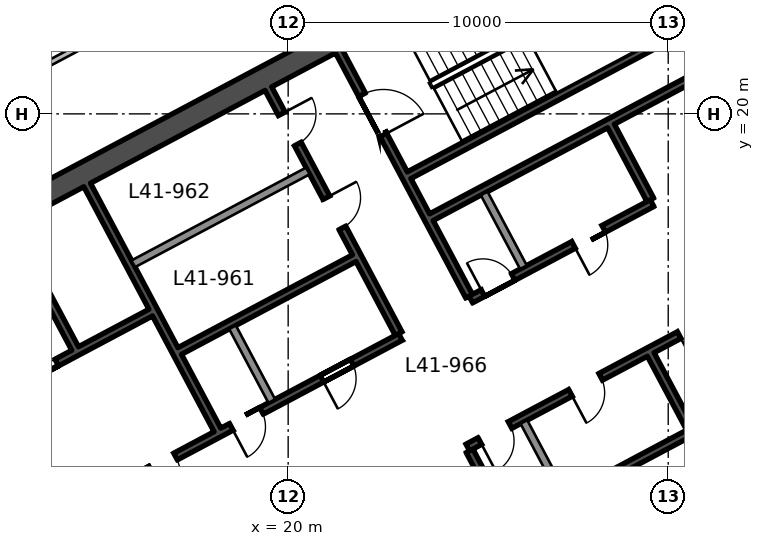
"""IFC4 building model, lengths in metres.
Left out: names, types, materials, properties, quantities, classifications, styles, units other than length and angle.
Written with IfcOpenShell. Run it as: python <this file> out.ifc"""

import sys

from ifc_helpers import new_model, si_unit, direction, frame, frame_2d, origin, place, context, subcontext, project, spatial, rectangle, extrude, element, fill, save


model = new_model("IFC4")
c1 = context("Model", 3, precision=1e-05, world=origin(), true_north=direction((0.0, 1.0)))
c2 = subcontext(c1, "Body", "Model", "MODEL_VIEW")
j1 = project(units=[si_unit("LENGTHUNIT", "METRE"), si_unit("PLANEANGLEUNIT", "RADIAN")], contexts=[c1])
p1 = place(None, origin())
s1 = spatial("IfcSite", under=j1, at=p1, CompositionType="ELEMENT")
p2 = place(p1, origin())
s2 = spatial("IfcBuilding", under=s1, at=p2, CompositionType="ELEMENT")
p3 = place(p2, frame((0.0, 0.0, 193.5)))
s3 = spatial("IfcBuildingStorey", under=s2, at=p3, CompositionType="ELEMENT", Elevation=193.5)
p4 = place(p3, frame((19.211, -0.771, 0.0), z_axis=(0.0, 0.0, 1.0), x_axis=(-0.469463742137, 0.882951751127, 0.0)))
e1 = element("IfcWall", 1, at=p4, inside=s3, PredefinedType="SHEAR", context=c2, shape_type="SweptSolid", body=[
    extrude(rectangle(XDim=19.4, YDim=0.6, at=frame_2d((9.7, 0.0))), origin(), (0.0, 0.0, 1.0), 3.9),
])
p5 = place(p4, frame((6.7, 0.0, 0.0)))
e2 = element("IfcOpeningElement", 2, at=p5, cuts=e1, PredefinedType="OPENING", context=c2, shape_type="SweptSolid", body=[
    extrude(rectangle(XDim=2.4, YDim=2.4, at=frame_2d((1.2, 1.2))), frame((0.0, 0.31, 0.0), z_axis=(0.0, -1.0, 0.0), x_axis=(1.0, 0.0, 0.0)), (0.0, 0.0, 1.0), 0.62),
])
p6 = place(p3, frame((37.576, 8.994, 0.0), z_axis=(0.0, 0.0, 1.0), x_axis=(-0.469478769487, 0.88294376095, 0.0)))
e3 = element("IfcWall", 3, at=p6, inside=s3, PredefinedType="SHEAR", context=c2, shape_type="SweptSolid", body=[
    extrude(rectangle(XDim=19.4, YDim=0.6, at=frame_2d((9.7, 0.0))), origin(), (0.0, 0.0, 1.0), 3.9),
])
p7 = place(p6, frame((10.3, 0.0, 0.0)))
e4 = element("IfcOpeningElement", 4, at=p7, cuts=e3, PredefinedType="OPENING", context=c2, shape_type="SweptSolid", body=[
    extrude(rectangle(XDim=2.4, YDim=2.4, at=frame_2d((1.2, 1.2))), frame((0.0, 0.31, 0.0), z_axis=(0.0, -1.0, 0.0), x_axis=(1.0, 0.0, 0.0)), (0.0, 0.0, 1.0), 0.62),
])
p8 = place(p3, frame((10.509, 16.234, 0.0), z_axis=(0.0, 0.0, 1.0), x_axis=(0.88295010195, 0.469466843842, 0.0)))
e5 = element("IfcWall", 5, at=p8, inside=s3, PredefinedType="SHEAR", context=c2, shape_type="SweptSolid", body=[
    extrude(rectangle(XDim=20.2, YDim=0.6, at=frame_2d((10.1, 0.0))), origin(), (0.0, 0.0, 1.0), 3.9),
])
p9 = place(p3, frame((14.394, 13.826, 0.0), z_axis=(0.0, 0.0, 1.0), x_axis=(-0.469494272526, 0.882935517501, 0.0)))
e6 = element("IfcWall", 6, at=p9, inside=s3, PredefinedType="SHEAR", context=c2, shape_type="SweptSolid", body=[
    extrude(rectangle(XDim=3.65, YDim=0.2, at=frame_2d((1.825, 0.0))), origin(), (0.0, 0.0, 1.0), 3.9),
])
p10 = place(p3, frame((18.138, 11.683, 0.0), z_axis=(0.0, 0.0, 1.0), x_axis=(-0.469480409012, 0.88294288918, 0.0)))
e7 = element("IfcWall", 7, at=p10, inside=s3, PredefinedType="SHEAR", context=c2, shape_type="SweptSolid", body=[
    extrude(rectangle(XDim=7.3, YDim=0.2, at=frame_2d((3.65, 0.0))), origin(), (0.0, 0.0, 1.0), 3.9),
])
p11 = place(p3, frame((19.569, 12.444, 0.0), z_axis=(0.0, 0.0, 1.0), x_axis=(-0.4694473164, 0.882960484464, 0.0)))
e8 = element("IfcWall", 8, at=p11, inside=s3, PredefinedType="SOLIDWALL", context=c2, shape_type="SweptSolid", body=[
    extrude(rectangle(XDim=2.2, YDim=0.2, at=frame_2d((1.1, 0.0))), origin(), (0.0, 0.0, 1.0), 3.9),
])
p12 = place(p3, frame((22.906, 14.218, 0.0), z_axis=(0.0, 0.0, 1.0), x_axis=(-0.469480409012, 0.88294288918, 0.0)))
e9 = element("IfcWall", 9, at=p12, inside=s3, PredefinedType="SHEAR", context=c2, shape_type="SweptSolid", body=[
    extrude(rectangle(XDim=7.3, YDim=0.2, at=frame_2d((3.65, 0.0))), origin(), (0.0, 0.0, 1.0), 3.9),
])
p13 = place(p12, frame((3.15, 0.0, 0.0)))
e10 = element("IfcOpeningElement", 10, at=p13, cuts=e9, PredefinedType="OPENING", context=c2, shape_type="SweptSolid", body=[
    extrude(rectangle(XDim=0.9, YDim=2.1, at=frame_2d((0.45, 1.05))), frame((0.0, 0.11, 0.0), z_axis=(0.0, -1.0, 0.0), x_axis=(1.0, 0.0, 0.0)), (0.0, 0.0, 1.0), 0.22),
])
p14 = place(p12, frame((5.65, 0.0, 0.0)))
e11 = element("IfcOpeningElement", 11, at=p14, cuts=e9, PredefinedType="OPENING", context=c2, shape_type="SweptSolid", body=[
    extrude(rectangle(XDim=0.9, YDim=2.1, at=frame_2d((0.45, 1.05))), frame((0.0, 0.11, 0.0), z_axis=(0.0, -1.0, 0.0), x_axis=(1.0, 0.0, 0.0)), (0.0, 0.0, 1.0), 0.22),
])
p15 = place(p3, frame((28.2, 4.688, 0.0), z_axis=(0.0, 0.0, 1.0), x_axis=(-0.469454336211, 0.882956752176, 0.0)))
e12 = element("IfcWall", 12, at=p15, inside=s3, PredefinedType="SHEAR", context=c2, shape_type="SweptSolid", body=[
    extrude(rectangle(XDim=7.3, YDim=0.2, at=frame_2d((3.65, 0.0))), origin(), (0.0, 0.0, 1.0), 3.9),
])
p16 = place(p15, frame((0.45, 0.0, 0.0)))
e13 = element("IfcOpeningElement", 13, at=p16, cuts=e12, PredefinedType="OPENING", context=c2, shape_type="SweptSolid", body=[
    extrude(rectangle(XDim=0.9, YDim=2.1, at=frame_2d((0.45, 1.05))), frame((0.0, 0.11, 0.0), z_axis=(0.0, -1.0, 0.0), x_axis=(1.0, 0.0, 0.0)), (0.0, 0.0, 1.0), 0.22),
])
p17 = place(p15, frame((2.15, 0.0, 0.0)))
e14 = element("IfcOpeningElement", 14, at=p17, cuts=e12, PredefinedType="OPENING", context=c2, shape_type="SweptSolid", body=[
    extrude(rectangle(XDim=0.9, YDim=2.1, at=frame_2d((0.45, 1.05))), frame((0.0, 0.11, 0.0), z_axis=(0.0, -1.0, 0.0), x_axis=(1.0, 0.0, 0.0)), (0.0, 0.0, 1.0), 0.22),
])
p18 = place(p15, frame((3.75, 0.0, 0.0)))
e15 = element("IfcOpeningElement", 15, at=p18, cuts=e12, PredefinedType="OPENING", context=c2, shape_type="SweptSolid", body=[
    extrude(rectangle(XDim=0.9, YDim=2.1, at=frame_2d((0.45, 1.05))), frame((0.0, 0.11, 0.0), z_axis=(0.0, -1.0, 0.0), x_axis=(1.0, 0.0, 0.0)), (0.0, 0.0, 1.0), 0.22),
])
p19 = place(p3, frame((27.236, 9.951, 0.0), z_axis=(0.0, 0.0, 1.0), x_axis=(-0.4694473164, 0.882960484464, 0.0)))
e16 = element("IfcWall", 16, at=p19, inside=s3, PredefinedType="SOLIDWALL", context=c2, shape_type="SweptSolid", body=[
    extrude(rectangle(XDim=2.2, YDim=0.2, at=frame_2d((1.1, 0.0))), origin(), (0.0, 0.0, 1.0), 3.9),
])
p20 = place(p3, frame((24.76, 15.204, 0.0), z_axis=(0.0, 0.0, 1.0), x_axis=(-0.469494272526, 0.882935517501, 0.0)))
e17 = element("IfcWall", 17, at=p20, inside=s3, PredefinedType="SHEAR", context=c2, shape_type="SweptSolid", body=[
    extrude(rectangle(XDim=7.3, YDim=0.2, at=frame_2d((3.65, 0.0))), origin(), (0.0, 0.0, 1.0), 3.9),
])
p21 = place(p20, frame((4.8, 0.0, 0.0)))
e18 = element("IfcOpeningElement", 18, at=p21, cuts=e17, PredefinedType="OPENING", context=c2, shape_type="SweptSolid", body=[
    extrude(rectangle(XDim=1.2, YDim=2.1, at=frame_2d((0.6, 1.05))), frame((0.0, 0.11, 0.0), z_axis=(0.0, -1.0, 0.0), x_axis=(1.0, 0.0, 0.0)), (0.0, 0.0, 1.0), 0.22),
])
p22 = place(p3, frame((26.191, 15.965, 0.0), z_axis=(0.0, 0.0, 1.0), x_axis=(-0.469533832133, 0.882914480843, 0.0)))
e19 = element("IfcWall", 19, at=p22, inside=s3, PredefinedType="SOLIDWALL", context=c2, shape_type="SweptSolid", body=[
    extrude(rectangle(XDim=2.2, YDim=0.2, at=frame_2d((1.1, 0.0))), origin(), (0.0, 0.0, 1.0), 3.9),
])
p23 = place(p3, frame((32.968, 7.223, 0.0), z_axis=(0.0, 0.0, 1.0), x_axis=(-0.469480409012, 0.88294288918, 0.0)))
e20 = element("IfcWall", 20, at=p23, inside=s3, PredefinedType="SHEAR", context=c2, shape_type="SweptSolid", body=[
    extrude(rectangle(XDim=7.3, YDim=0.2, at=frame_2d((3.65, 0.0))), origin(), (0.0, 0.0, 1.0), 3.9),
])
p24 = place(p3, frame((29.528, 17.739, 0.0), z_axis=(0.0, 0.0, 1.0), x_axis=(-0.469401318492, 0.882984938828, 0.0)))
e21 = element("IfcWall", 21, at=p24, inside=s3, PredefinedType="SHEAR", context=c2, shape_type="SweptSolid", body=[
    extrude(rectangle(XDim=2.2, YDim=0.2, at=frame_2d((1.1, 0.0))), origin(), (0.0, 0.0, 1.0), 3.9),
])
p25 = place(p3, frame((25.941, 9.15, 0.0), z_axis=(0.0, 0.0, 1.0), x_axis=(0.882953967957, 0.469459572775, 0.0)))
e22 = element("IfcWall", 22, at=p25, inside=s3, PredefinedType="SHEAR", context=c2, shape_type="SweptSolid", body=[
    extrude(rectangle(XDim=5.2, YDim=0.2, at=frame_2d((2.6, 0.0))), origin(), (0.0, 0.0, 1.0), 3.9),
])
p26 = place(p3, frame((24.726, 11.222, 0.0), z_axis=(0.0, 0.0, 1.0), x_axis=(0.882940221191, 0.469485426614, 0.0)))
e23 = element("IfcWall", 23, at=p26, inside=s3, PredefinedType="SHEAR", context=c2, shape_type="SweptSolid", body=[
    extrude(rectangle(XDim=10.0, YDim=0.2, at=frame_2d((5.0, 0.0))), origin(), (0.0, 0.0, 1.0), 3.9),
])
p27 = place(p26, frame((6.3, 0.0, 0.0)))
e24 = element("IfcOpeningElement", 24, at=p27, cuts=e23, PredefinedType="OPENING", context=c2, shape_type="SweptSolid", body=[
    extrude(rectangle(XDim=1.2, YDim=2.1, at=frame_2d((0.6, 1.05))), frame((0.0, 0.11, 0.0), z_axis=(0.0, -1.0, 0.0), x_axis=(1.0, 0.0, 0.0)), (0.0, 0.0, 1.0), 0.22),
])
p28 = place(p26, frame((0.36, 0.0, 0.0)))
e25 = element("IfcOpeningElement", 25, at=p28, cuts=e23, PredefinedType="OPENING", context=c2, shape_type="SweptSolid", body=[
    extrude(rectangle(XDim=0.9, YDim=2.1, at=frame_2d((0.45, 1.05))), frame((0.0, 0.11, 0.0), z_axis=(0.0, -1.0, 0.0), x_axis=(1.0, 0.0, 0.0)), (0.0, 0.0, 1.0), 0.22),
])
p29 = place(p26, frame((3.06, 0.0, 0.0)))
e26 = element("IfcOpeningElement", 26, at=p29, cuts=e23, PredefinedType="OPENING", context=c2, shape_type="SweptSolid", body=[
    extrude(rectangle(XDim=0.9, YDim=2.1, at=frame_2d((0.45, 1.05))), frame((0.0, 0.11, 0.0), z_axis=(0.0, -1.0, 0.0), x_axis=(1.0, 0.0, 0.0)), (0.0, 0.0, 1.0), 0.22),
])
p30 = place(p3, frame((14.124, 9.435, 0.0), z_axis=(0.0, 0.0, 1.0), x_axis=(0.882940221191, 0.469485426614, 0.0)))
e27 = element("IfcWall", 27, at=p30, inside=s3, PredefinedType="SHEAR", context=c2, shape_type="SweptSolid", body=[
    extrude(rectangle(XDim=10.0, YDim=0.2, at=frame_2d((5.0, 0.0))), origin(), (0.0, 0.0, 1.0), 3.9),
])
p31 = place(p30, frame((2.1, 0.0, 0.0)))
e28 = element("IfcOpeningElement", 28, at=p31, cuts=e27, PredefinedType="OPENING", context=c2, shape_type="SweptSolid", body=[
    extrude(rectangle(XDim=1.2, YDim=2.1, at=frame_2d((0.6, 1.05))), frame((0.0, 0.11, 0.0), z_axis=(0.0, -1.0, 0.0), x_axis=(1.0, 0.0, 0.0)), (0.0, 0.0, 1.0), 0.22),
])
p32 = place(p30, frame((4.96, 0.0, 0.0)))
e29 = element("IfcOpeningElement", 29, at=p32, cuts=e27, PredefinedType="OPENING", context=c2, shape_type="SweptSolid", body=[
    extrude(rectangle(XDim=0.9, YDim=2.1, at=frame_2d((0.45, 1.05))), frame((0.0, 0.11, 0.0), z_axis=(0.0, -1.0, 0.0), x_axis=(1.0, 0.0, 0.0)), (0.0, 0.0, 1.0), 0.22),
])
p33 = place(p30, frame((7.66, 0.0, 0.0)))
e30 = element("IfcOpeningElement", 30, at=p33, cuts=e27, PredefinedType="OPENING", context=c2, shape_type="SweptSolid", body=[
    extrude(rectangle(XDim=0.9, YDim=2.1, at=frame_2d((0.45, 1.05))), frame((0.0, 0.11, 0.0), z_axis=(0.0, -1.0, 0.0), x_axis=(1.0, 0.0, 0.0)), (0.0, 0.0, 1.0), 0.22),
])
p34 = place(p3, frame((24.807, 15.116, 0.0), z_axis=(0.0, 0.0, 1.0), x_axis=(0.882942972946, 0.469480251476, 0.0)))
e31 = element("IfcWall", 31, at=p34, inside=s3, PredefinedType="SHEAR", context=c2, shape_type="SweptSolid", body=[
    extrude(rectangle(XDim=5.4, YDim=0.2, at=frame_2d((2.7, 0.0))), origin(), (0.0, 0.0, 1.0), 3.9),
])
p35 = place(p34, frame((0.36, 0.0, 0.0)))
e32 = element("IfcOpeningElement", 32, at=p35, cuts=e31, PredefinedType="OPENING", context=c2, shape_type="SweptSolid", body=[
    extrude(rectangle(XDim=0.9, YDim=2.1, at=frame_2d((0.45, 1.05))), frame((0.0, 0.11, 0.0), z_axis=(0.0, -1.0, 0.0), x_axis=(1.0, 0.0, 0.0)), (0.0, 0.0, 1.0), 0.22),
])
p36 = place(p34, frame((3.06, 0.0, 0.0)))
e33 = element("IfcOpeningElement", 33, at=p36, cuts=e31, PredefinedType="OPENING", context=c2, shape_type="SweptSolid", body=[
    extrude(rectangle(XDim=0.9, YDim=2.1, at=frame_2d((0.45, 1.05))), frame((0.0, 0.11, 0.0), z_axis=(0.0, -1.0, 0.0), x_axis=(1.0, 0.0, 0.0)), (0.0, 0.0, 1.0), 0.22),
])
p37 = place(p3, frame((17.147, 13.761, 0.0), z_axis=(0.0, 0.0, 1.0), x_axis=(0.882964314875, 0.469440111896, 0.0)))
e34 = element("IfcWall", 34, at=p37, inside=s3, PredefinedType="SHEAR", context=c2, shape_type="SweptSolid", body=[
    extrude(rectangle(XDim=5.2, YDim=0.2, at=frame_2d((2.6, 0.0))), origin(), (0.0, 0.0, 1.0), 3.9),
])
p38 = place(p3, frame((23.769, 17.282, 0.0), z_axis=(0.0, 0.0, 1.0), x_axis=(0.882940221191, 0.469485426614, 0.0)))
e35 = element("IfcWall", 35, at=p38, inside=s3, PredefinedType="SHEAR", context=c2, shape_type="SweptSolid", body=[
    extrude(rectangle(XDim=8.0, YDim=0.2, at=frame_2d((4.0, 0.0))), origin(), (0.0, 0.0, 1.0), 3.9),
])
p39 = place(p3, frame((12.41, 12.658, 0.0), z_axis=(0.0, 0.0, 1.0), x_axis=(0.8829484765, 0.469469900894, 0.0)))
e36 = element("IfcWall", 36, at=p39, inside=s3, PredefinedType="SHEAR", context=c2, shape_type="SweptSolid", body=[
    extrude(rectangle(XDim=4.5, YDim=0.2, at=frame_2d((2.25, 0.0))), origin(), (0.0, 0.0, 1.0), 3.9),
])
p40 = place(p39, frame((0.6, 0.0, 0.0)))
e37 = element("IfcOpeningElement", 37, at=p40, cuts=e36, PredefinedType="OPENING", context=c2, shape_type="SweptSolid", body=[
    extrude(rectangle(XDim=1.1, YDim=2.1, at=frame_2d((0.55, 1.05))), frame((0.0, 0.11, 0.0), z_axis=(0.0, -1.0, 0.0), x_axis=(1.0, 0.0, 0.0)), (0.0, 0.0, 1.0), 0.22),
])
p41 = place(p3, frame((23.182, 18.385, 0.0), z_axis=(0.0, 0.0, 1.0), x_axis=(0.88295287151, 0.469461634952, 0.0)))
e38 = element("IfcWall", 38, at=p41, inside=s3, PredefinedType="SHEAR", context=c2, shape_type="SweptSolid", body=[
    extrude(rectangle(XDim=8.0, YDim=0.2, at=frame_2d((4.0, 0.0))), origin(), (0.0, 0.0, 1.0), 3.9),
])
p42 = place(p3, frame((15.926, 16.056, 0.0), z_axis=(0.0, 0.0, 1.0), x_axis=(0.882953967957, 0.469459572775, 0.0)))
e39 = element("IfcWall", 39, at=p42, inside=s3, PredefinedType="SOLIDWALL", context=c2, shape_type="SweptSolid", body=[
    extrude(rectangle(XDim=5.2, YDim=0.2, at=frame_2d((2.6, 0.0))), origin(), (0.0, 0.0, 1.0), 3.9),
])
p43 = place(p3, frame((0.0, 14.044, 0.0), z_axis=(0.0, 0.0, 1.0), x_axis=(0.882962129795, 0.469444221764, 0.0)))
e40 = element("IfcWall", 40, at=p43, inside=s3, PredefinedType="PARTITIONING", context=c2, shape_type="SweptSolid", body=[
    extrude(rectangle(XDim=41.607, YDim=0.15, at=frame_2d((20.803, 0.0))), origin(), (0.0, 0.0, 1.0), 3.54),
])
p44 = place(p43, frame((19.95, 0.0, 0.0)))
e41 = element("IfcOpeningElement", 41, at=p44, cuts=e40, PredefinedType="OPENING", context=c2, shape_type="SweptSolid", body=[
    extrude(rectangle(XDim=1.8, YDim=2.1, at=frame_2d((0.9, 1.05))), frame((0.0, 0.085, 0.0), z_axis=(0.0, -1.0, 0.0), x_axis=(1.0, 0.0, 0.0)), (0.0, 0.0, 1.0), 0.17),
])
p45 = place(p43, frame((10.25, 0.0, 0.0)))
e42 = element("IfcOpeningElement", 42, at=p45, cuts=e40, PredefinedType="OPENING", context=c2, shape_type="SweptSolid", body=[
    extrude(rectangle(XDim=1.0, YDim=2.1, at=frame_2d((0.5, 1.05))), frame((0.0, 0.085, 0.0), z_axis=(0.0, -1.0, 0.0), x_axis=(1.0, 0.0, 0.0)), (0.0, 0.0, 1.0), 0.17),
])
p46 = place(p3, frame((48.38, 11.679, 0.0), z_axis=(0.0, 0.0, 1.0), x_axis=(-0.882962559816, -0.469443412951, 0.0)))
e43 = element("IfcWall", 43, at=p46, inside=s3, PredefinedType="PARTITIONING", context=c2, shape_type="SweptSolid", body=[
    extrude(rectangle(XDim=39.163, YDim=0.15, at=frame_2d((19.582, 0.0))), origin(), (0.0, 0.0, 1.0), 3.54),
])
p47 = place(p46, frame((20.45, 0.0, 0.0)))
e44 = element("IfcOpeningElement", 44, at=p47, cuts=e43, PredefinedType="OPENING", context=c2, shape_type="SweptSolid", body=[
    extrude(rectangle(XDim=1.0, YDim=2.1, at=frame_2d((0.5, 1.05))), frame((0.0, 0.085, 0.0), z_axis=(0.0, -1.0, 0.0), x_axis=(1.0, 0.0, 0.0)), (0.0, 0.0, 1.0), 0.17),
])
p48 = place(p46, frame((18.75, 0.0, 0.0)))
e45 = element("IfcOpeningElement", 45, at=p48, cuts=e43, PredefinedType="OPENING", context=c2, shape_type="SweptSolid", body=[
    extrude(rectangle(XDim=1.0, YDim=2.1, at=frame_2d((0.5, 1.05))), frame((0.0, 0.085, 0.0), z_axis=(0.0, -1.0, 0.0), x_axis=(1.0, 0.0, 0.0)), (0.0, 0.0, 1.0), 0.17),
])
p49 = place(p31, frame((1.2, 0.0, 0.0), z_axis=(0.0, 0.0, 1.0), x_axis=(-1.0, 0.0, 0.0)))
e46 = element("IfcDoor", 46, at=p49, inside=s3, OperationType="SINGLE_SWING_RIGHT", PredefinedType="DOOR", context=c2, shape_type="SweptSolid", body=[
    extrude(rectangle(XDim=1.2, YDim=2.1, at=frame_2d((0.6, 1.05))), frame((0.0, 0.025, 0.0), z_axis=(0.0, -1.0, 0.0), x_axis=(1.0, 0.0, 0.0)), (0.0, 0.0, 1.0), 0.05),
])
fill(e28, e46)
p50 = place(p27, frame((1.2, 0.0, 0.0), z_axis=(0.0, 0.0, 1.0), x_axis=(-1.0, 0.0, 0.0)))
e47 = element("IfcDoor", 47, at=p50, inside=s3, OperationType="SINGLE_SWING_RIGHT", PredefinedType="DOOR", context=c2, shape_type="SweptSolid", body=[
    extrude(rectangle(XDim=1.2, YDim=2.1, at=frame_2d((0.6, 1.05))), frame((0.0, 0.025, 0.0), z_axis=(0.0, -1.0, 0.0), x_axis=(1.0, 0.0, 0.0)), (0.0, 0.0, 1.0), 0.05),
])
fill(e24, e47)
p51 = place(p21, frame((1.2, 0.0, 0.0), z_axis=(0.0, 0.0, 1.0), x_axis=(-1.0, 0.0, 0.0)))
e48 = element("IfcDoor", 48, at=p51, inside=s3, OperationType="SINGLE_SWING_RIGHT", PredefinedType="DOOR", context=c2, shape_type="SweptSolid", body=[
    extrude(rectangle(XDim=1.2, YDim=2.1, at=frame_2d((0.6, 1.05))), frame((0.0, 0.025, 0.0), z_axis=(0.0, -1.0, 0.0), x_axis=(1.0, 0.0, 0.0)), (0.0, 0.0, 1.0), 0.05),
])
fill(e18, e48)
p52 = place(p32, frame((0.9, 0.0, 0.0), z_axis=(0.0, 0.0, 1.0), x_axis=(-1.0, 0.0, 0.0)))
e49 = element("IfcDoor", 49, at=p52, inside=s3, OperationType="SINGLE_SWING_RIGHT", PredefinedType="DOOR", context=c2, shape_type="SweptSolid", body=[
    extrude(rectangle(XDim=0.9, YDim=2.1, at=frame_2d((0.45, 1.05))), frame((0.0, 0.025, 0.0), z_axis=(0.0, -1.0, 0.0), x_axis=(1.0, 0.0, 0.0)), (0.0, 0.0, 1.0), 0.05),
])
fill(e29, e49)
p53 = place(p33, frame((0.9, 0.0, 0.0), z_axis=(0.0, 0.0, 1.0), x_axis=(-1.0, 0.0, 0.0)))
e50 = element("IfcDoor", 50, at=p53, inside=s3, OperationType="SINGLE_SWING_RIGHT", PredefinedType="DOOR", context=c2, shape_type="SweptSolid", body=[
    extrude(rectangle(XDim=0.9, YDim=2.1, at=frame_2d((0.45, 1.05))), frame((0.0, 0.025, 0.0), z_axis=(0.0, -1.0, 0.0), x_axis=(1.0, 0.0, 0.0)), (0.0, 0.0, 1.0), 0.05),
])
fill(e30, e50)
p54 = place(p35, origin())
e51 = element("IfcDoor", 51, at=p54, inside=s3, OperationType="SINGLE_SWING_LEFT", PredefinedType="DOOR", context=c2, shape_type="SweptSolid", body=[
    extrude(rectangle(XDim=0.9, YDim=2.1, at=frame_2d((0.45, 1.05))), frame((0.0, 0.025, 0.0), z_axis=(0.0, -1.0, 0.0), x_axis=(1.0, 0.0, 0.0)), (0.0, 0.0, 1.0), 0.05),
])
fill(e32, e51)
p55 = place(p36, frame((0.9, 0.0, 0.0), z_axis=(0.0, 0.0, 1.0), x_axis=(-1.0, 0.0, 0.0)))
e52 = element("IfcDoor", 52, at=p55, inside=s3, OperationType="SINGLE_SWING_RIGHT", PredefinedType="DOOR", context=c2, shape_type="SweptSolid", body=[
    extrude(rectangle(XDim=0.9, YDim=2.1, at=frame_2d((0.45, 1.05))), frame((0.0, 0.025, 0.0), z_axis=(0.0, -1.0, 0.0), x_axis=(1.0, 0.0, 0.0)), (0.0, 0.0, 1.0), 0.05),
])
fill(e33, e52)
p56 = place(p28, frame((0.9, 0.0, 0.0), z_axis=(0.0, 0.0, 1.0), x_axis=(-1.0, 0.0, 0.0)))
e53 = element("IfcDoor", 53, at=p56, inside=s3, OperationType="SINGLE_SWING_RIGHT", PredefinedType="DOOR", context=c2, shape_type="SweptSolid", body=[
    extrude(rectangle(XDim=0.9, YDim=2.1, at=frame_2d((0.45, 1.05))), frame((0.0, 0.025, 0.0), z_axis=(0.0, -1.0, 0.0), x_axis=(1.0, 0.0, 0.0)), (0.0, 0.0, 1.0), 0.05),
])
fill(e25, e53)
p57 = place(p29, frame((0.9, 0.0, 0.0), z_axis=(0.0, 0.0, 1.0), x_axis=(-1.0, 0.0, 0.0)))
e54 = element("IfcDoor", 54, at=p57, inside=s3, OperationType="SINGLE_SWING_RIGHT", PredefinedType="DOOR", context=c2, shape_type="SweptSolid", body=[
    extrude(rectangle(XDim=0.9, YDim=2.1, at=frame_2d((0.45, 1.05))), frame((0.0, 0.025, 0.0), z_axis=(0.0, -1.0, 0.0), x_axis=(1.0, 0.0, 0.0)), (0.0, 0.0, 1.0), 0.05),
])
fill(e26, e54)
p58 = place(p40, origin())
e55 = element("IfcDoor", 55, at=p58, inside=s3, OperationType="DOUBLE_DOOR_SLIDING", PredefinedType="DOOR", context=c2, shape_type="SweptSolid", body=[
    extrude(rectangle(XDim=1.1, YDim=2.1, at=frame_2d((0.55, 1.05))), frame((0.0, 0.025, 0.0), z_axis=(0.0, -1.0, 0.0), x_axis=(1.0, 0.0, 0.0)), (0.0, 0.0, 1.0), 0.05),
])
fill(e37, e55)
p59 = place(p13, frame((0.9, 0.0, 0.0), z_axis=(0.0, 0.0, 1.0), x_axis=(-1.0, 0.0, 0.0)))
e56 = element("IfcDoor", 56, at=p59, inside=s3, OperationType="SINGLE_SWING_LEFT", PredefinedType="DOOR", context=c2, shape_type="SweptSolid", body=[
    extrude(rectangle(XDim=0.9, YDim=2.1, at=frame_2d((0.45, 1.05))), frame((0.0, 0.025, 0.0), z_axis=(0.0, -1.0, 0.0), x_axis=(1.0, 0.0, 0.0)), (0.0, 0.0, 1.0), 0.05),
])
fill(e10, e56)
p60 = place(p14, frame((0.9, 0.0, 0.0), z_axis=(0.0, 0.0, 1.0), x_axis=(-1.0, 0.0, 0.0)))
e57 = element("IfcDoor", 57, at=p60, inside=s3, OperationType="SINGLE_SWING_LEFT", PredefinedType="DOOR", context=c2, shape_type="SweptSolid", body=[
    extrude(rectangle(XDim=0.9, YDim=2.1, at=frame_2d((0.45, 1.05))), frame((0.0, 0.025, 0.0), z_axis=(0.0, -1.0, 0.0), x_axis=(1.0, 0.0, 0.0)), (0.0, 0.0, 1.0), 0.05),
])
fill(e11, e57)
save(model, sys.argv[1])
